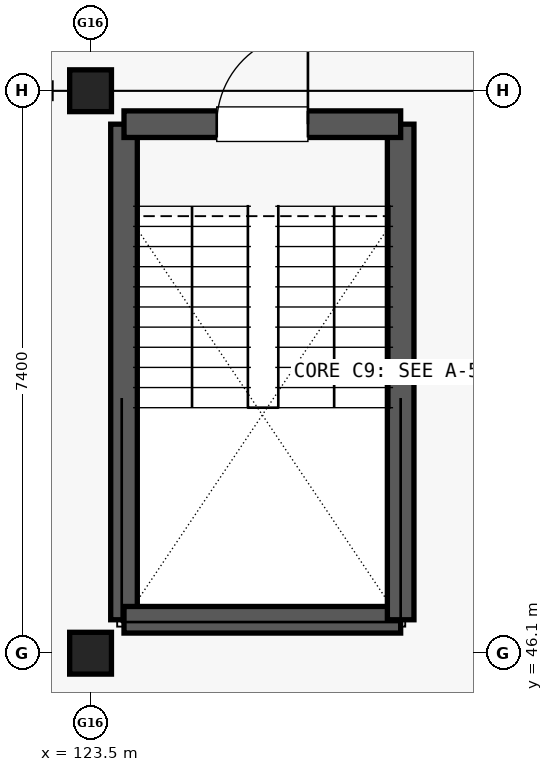
"""IFC4 building model, lengths in metres.
Left out: names, types, materials, properties, quantities, classifications, styles, units other than length and angle.
Written with IfcOpenShell. Run it as: python <this file> out.ifc"""

import sys

from ifc_helpers import new_model, si_unit, direction, frame, frame_2d, origin, origin_2d, place, context, subcontext, project, spatial, rectangle, extrude, element, fill, save


model = new_model("IFC4")
c1 = context("Model", 3, precision=1e-05, world=origin(), true_north=direction((0.0, 1.0)))
c2 = subcontext(c1, "Body", "Model", "MODEL_VIEW")
j1 = project(units=[si_unit("LENGTHUNIT", "METRE"), si_unit("PLANEANGLEUNIT", "RADIAN")], contexts=[c1])
p1 = place(None, origin())
s1 = spatial("IfcSite", under=j1, at=p1, CompositionType="ELEMENT")
p2 = place(p1, origin())
s2 = spatial("IfcBuilding", under=s1, at=p2, CompositionType="ELEMENT")
p3 = place(p2, frame((0.0, 0.0, 10.2)))
s3 = spatial("IfcBuildingStorey", under=s2, at=p3, CompositionType="ELEMENT", Elevation=10.2)
for number, where, z_axis, x_axis in (
    (1, (123.5, 46.1, 0.0), (0.0, 0.0, 1.0), (1.0, 0.0, 0.0)),
    (2, (123.5, 53.5, 0.0), (0.0, 0.0, 1.0), (1.0, 0.0, 0.0)),
):
    element("IfcColumn", number, at=place(p3, frame(where, z_axis=z_axis, x_axis=x_axis)), inside=s3, PredefinedType="COLUMN", context=c2, shape_type="SweptSolid", body=[
        extrude(rectangle(XDim=0.55, YDim=0.55, at=origin_2d()), origin(), (0.0, 0.0, 1.0), 3.37),
    ])
p4 = place(p3, frame((123.94, 46.54, 0.0), z_axis=(0.0, 0.0, 1.0), x_axis=(0.0, 1.0, 0.0)))
e3 = element("IfcWall", 3, at=p4, inside=s3, PredefinedType="SHEAR", context=c2, shape_type="SweptSolid", body=[
    extrude(rectangle(XDim=6.52, YDim=0.35, at=frame_2d((3.26, 0.0))), origin(), (0.0, 0.0, 1.0), 3.365),
])
p5 = place(p3, frame((123.94, 46.54, 0.0), z_axis=(0.0, 0.0, 1.0), x_axis=(1.0, 0.0, 0.0)))
e4 = element("IfcWall", 4, at=p5, inside=s3, PredefinedType="SHEAR", context=c2, shape_type="SweptSolid", body=[
    extrude(rectangle(XDim=3.64, YDim=0.35, at=frame_2d((1.82, 0.0))), origin(), (0.0, 0.0, 1.0), 3.365),
])
p6 = place(p3, frame((127.58, 46.54, 0.0), z_axis=(0.0, 0.0, 1.0), x_axis=(0.0, 1.0, 0.0)))
e5 = element("IfcWall", 5, at=p6, inside=s3, PredefinedType="SHEAR", context=c2, shape_type="SweptSolid", body=[
    extrude(rectangle(XDim=6.52, YDim=0.35, at=frame_2d((3.26, 0.0))), origin(), (0.0, 0.0, 1.0), 3.365),
])
p7 = place(p3, frame((123.94, 53.06, 0.0), z_axis=(0.0, 0.0, 1.0), x_axis=(1.0, 0.0, 0.0)))
e6 = element("IfcWall", 6, at=p7, inside=s3, PredefinedType="SHEAR", context=c2, shape_type="SweptSolid", body=[
    extrude(rectangle(XDim=3.64, YDim=0.35, at=frame_2d((1.82, 0.0))), origin(), (0.0, 0.0, 1.0), 3.365),
])
p8 = place(p7, frame((1.22, 0.0, 0.0)))
e7 = element("IfcOpeningElement", 7, at=p8, cuts=e6, PredefinedType="OPENING", context=c2, shape_type="SweptSolid", body=[
    extrude(rectangle(XDim=1.2, YDim=2.15, at=frame_2d((0.6, 1.075))), frame((0.0, 0.185, 0.0), z_axis=(0.0, -1.0, 0.0), x_axis=(1.0, 0.0, 0.0)), (0.0, 0.0, 1.0), 0.37),
])
p9 = place(p8, origin())
e8 = element("IfcDoor", 8, at=p9, inside=s3, OperationType="SINGLE_SWING_RIGHT", PredefinedType="DOOR", context=c2, shape_type="SweptSolid", body=[
    extrude(rectangle(XDim=1.2, YDim=2.15, at=frame_2d((0.6, 1.075))), frame((0.0, 0.025, 0.0), z_axis=(0.0, -1.0, 0.0), x_axis=(1.0, 0.0, 0.0)), (0.0, 0.0, 1.0), 0.05),
])
fill(e7, e8)
save(model, sys.argv[1])
